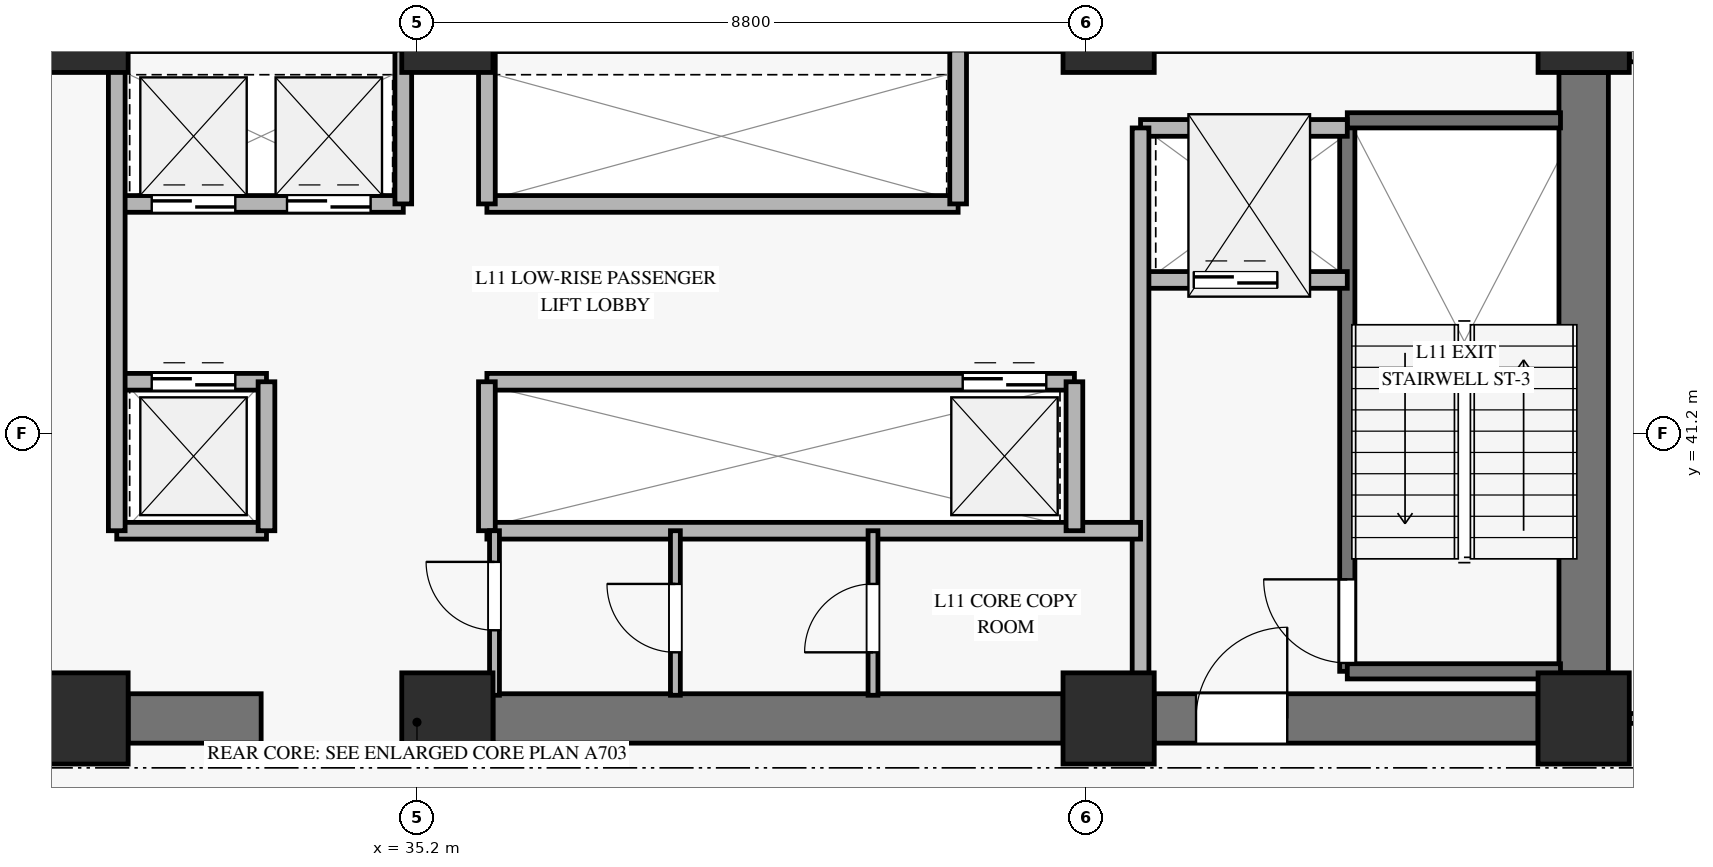
"""IFC4 building model, lengths in metres.
Left out: names, types, materials, properties, quantities, classifications, styles, units other than length and angle.
Written with IfcOpenShell. Run it as: python <this file> out.ifc"""

import sys

from ifc_helpers import new_model, si_unit, direction, frame, frame_2d, origin, origin_2d, place, context, subcontext, project, spatial, rectangle, extrude, source, transform, mapped, element, fill, save


model = new_model("IFC4")
c1 = context("Model", 3, precision=1e-05, world=origin(), true_north=direction((0.0, 1.0)))
c2 = subcontext(c1, "Body", "Model", "MODEL_VIEW")
j1 = project(units=[si_unit("LENGTHUNIT", "METRE"), si_unit("PLANEANGLEUNIT", "RADIAN")], contexts=[c1])
p1 = place(None, origin())
s1 = spatial("IfcSite", under=j1, at=p1, CompositionType="ELEMENT")
p2 = place(p1, origin())
s2 = spatial("IfcBuilding", under=s1, at=p2, CompositionType="ELEMENT")
p3 = place(p2, frame((0.0, 0.0, 44.9)))
s3 = spatial("IfcBuildingStorey", under=s2, at=p3, CompositionType="ELEMENT", Elevation=44.9)
m1 = source(origin(), c2, "Body", "SweptSolid", [
    extrude(rectangle(XDim=1.2, YDim=1.2, at=origin_2d()), origin(), (0.0, 0.0, 1.0), 3.62),
])
for number, where, z_axis, x_axis in (
    (1, (30.8, 37.45, 0.0), (0.0, 0.0, 1.0), (1.0, 0.0, 0.0)),
    (2, (30.8, 46.55, 0.0), (0.0, 0.0, 1.0), (1.0, 0.0, 0.0)),
    (3, (35.6, 37.45, 0.0), (0.0, 0.0, 1.0), (1.0, 0.0, 0.0)),
    (4, (35.6, 46.55, 0.0), (0.0, 0.0, 1.0), (1.0, 0.0, 0.0)),
    (5, (44.3, 37.45, 0.0), (0.0, 0.0, 1.0), (1.0, 0.0, 0.0)),
    (6, (44.3, 46.55, 0.0), (0.0, 0.0, 1.0), (1.0, 0.0, 0.0)),
    (7, (50.55, 37.45, 0.0), (0.0, 0.0, 1.0), (1.0, 0.0, 0.0)),
    (8, (50.55, 46.55, 0.0), (0.0, 0.0, 1.0), (1.0, 0.0, 0.0)),
):
    element("IfcColumn", number, at=place(p3, frame(where, z_axis=z_axis, x_axis=x_axis)), inside=s3, PredefinedType="PILASTER", context=c2, shape_type="MappedRepresentation", body=[
        mapped(m1, transform((0.0, 0.0, 0.0), x_axis=(1.0, 0.0, 0.0), y_axis=(0.0, 1.0, 0.0), z_axis=(0.0, 0.0, 1.0), scale=1.0)),
    ])
p4 = place(p3, frame((31.4, 37.45, 0.0), z_axis=(0.0, 0.0, 1.0), x_axis=(1.0, 0.0, 0.0)))
e9 = element("IfcWall", 9, at=p4, inside=s3, PredefinedType="SHEAR", context=c2, shape_type="SweptSolid", body=[
    extrude(rectangle(XDim=1.75, YDim=0.65, at=frame_2d((0.875, 0.0))), origin(), (0.0, 0.0, 1.0), 3.62),
])
p5 = place(p3, frame((36.2, 37.45, 0.0), z_axis=(0.0, 0.0, 1.0), x_axis=(1.0, 0.0, 0.0)))
e10 = element("IfcWall", 10, at=p5, inside=s3, PredefinedType="SHEAR", context=c2, shape_type="SweptSolid", body=[
    extrude(rectangle(XDim=7.5, YDim=0.65, at=frame_2d((3.75, 0.0))), origin(), (0.0, 0.0, 1.0), 3.62),
])
p6 = place(p3, frame((44.9, 37.45, 0.0), z_axis=(0.0, 0.0, 1.0), x_axis=(1.0, 0.0, 0.0)))
e11 = element("IfcWall", 11, at=p6, inside=s3, PredefinedType="SHEAR", context=c2, shape_type="SweptSolid", body=[
    extrude(rectangle(XDim=5.05, YDim=0.65, at=frame_2d((2.525, 0.0))), origin(), (0.0, 0.0, 1.0), 3.62),
])
p7 = place(p6, frame((0.55, 0.0, 0.0)))
e12 = element("IfcOpeningElement", 12, at=p7, cuts=e11, PredefinedType="OPENING", context=c2, shape_type="SweptSolid", body=[
    extrude(rectangle(XDim=1.2, YDim=2.15, at=frame_2d((0.6, 1.075))), frame((0.0, 0.335, 0.0), z_axis=(0.0, -1.0, 0.0), x_axis=(1.0, 0.0, 0.0)), (0.0, 0.0, 1.0), 0.67),
])
p8 = place(p3, frame((50.55, 38.05, 0.0), z_axis=(0.0, 0.0, 1.0), x_axis=(0.0, 1.0, 0.0)))
e13 = element("IfcWall", 13, at=p8, inside=s3, PredefinedType="SHEAR", context=c2, shape_type="SweptSolid", body=[
    extrude(rectangle(XDim=7.9, YDim=0.65, at=frame_2d((3.95, 0.0))), origin(), (0.0, 0.0, 1.0), 3.62),
])
p9 = place(p3, frame((51.15, 46.25, 0.0), z_axis=(0.0, 0.0, 1.0), x_axis=(1.0, 0.0, 0.0)))
e14 = element("IfcWall", 14, at=p9, inside=s3, PredefinedType="SOLIDWALL", context=c2, shape_type="SweptSolid", body=[
    extrude(rectangle(XDim=12.191, YDim=0.32, at=frame_2d((6.096, 0.0))), origin(), (0.0, 0.0, 1.0), 3.1),
])
p10 = place(p9, frame((5.296, 0.0, 0.45)))
e15 = element("IfcOpeningElement", 15, at=p10, cuts=e14, PredefinedType="OPENING", context=c2, shape_type="SweptSolid", body=[
    extrude(rectangle(XDim=1.6, YDim=2.0, at=frame_2d((0.8, 1.0))), frame((0.0, 0.17, 0.0), z_axis=(0.0, -1.0, 0.0), x_axis=(1.0, 0.0, 0.0)), (0.0, 0.0, 1.0), 0.34),
])
p11 = place(p3, frame((47.44, 38.07, 0.0), z_axis=(0.0, 0.0, 1.0), x_axis=(0.0, 1.0, 0.0)))
e16 = element("IfcWall", 16, at=p11, inside=s3, PredefinedType="SOLIDWALL", context=c2, shape_type="SweptSolid", body=[
    extrude(rectangle(XDim=7.25, YDim=0.2, at=frame_2d((3.625, 0.0))), origin(), (0.0, 0.0, 1.0), 3.9),
])
p12 = place(p11, frame((0.11, 0.0, 0.0)))
e17 = element("IfcOpeningElement", 17, at=p12, cuts=e16, PredefinedType="OPENING", context=c2, shape_type="SweptSolid", body=[
    extrude(rectangle(XDim=1.1, YDim=2.15, at=frame_2d((0.55, 1.075))), frame((0.0, 0.11, 0.0), z_axis=(0.0, -1.0, 0.0), x_axis=(1.0, 0.0, 0.0)), (0.0, 0.0, 1.0), 0.22),
])
for number, where, z_axis, x_axis in (
    (18, (47.44, 45.32, 0.0), (0.0, 0.0, 1.0), (1.0, 0.0, 0.0)),
    (19, (47.44, 38.07, 0.0), (0.0, 0.0, 1.0), (1.0, 0.0, 0.0)),
):
    element("IfcWall", number, at=place(p3, frame(where, z_axis=z_axis, x_axis=x_axis)), inside=s3, PredefinedType="SOLIDWALL", context=c2, shape_type="SweptSolid", body=[
        extrude(rectangle(XDim=2.805, YDim=0.2, at=frame_2d((1.403, 0.0))), origin(), (0.0, 0.0, 1.0), 3.9),
    ])
p13 = place(p3, frame((44.72, 43.22, 0.0), z_axis=(0.0, 0.0, 1.0), x_axis=(1.0, 0.0, 0.0)))
e20 = element("IfcWall", 20, at=p13, inside=s3, PredefinedType="SOLIDWALL", context=c2, shape_type="SweptSolid", body=[
    extrude(rectangle(XDim=2.72, YDim=0.22, at=frame_2d((1.36, 0.0))), origin(), (0.0, 0.0, 1.0), 3.62),
])
p14 = place(p13, frame((0.7, 0.0, 0.0)))
e21 = element("IfcOpeningElement", 21, at=p14, cuts=e20, PredefinedType="OPENING", context=c2, shape_type="SweptSolid", body=[
    extrude(rectangle(XDim=1.1, YDim=2.2, at=frame_2d((0.55, 1.1))), frame((0.0, 0.12, 0.0), z_axis=(0.0, -1.0, 0.0), x_axis=(1.0, 0.0, 0.0)), (0.0, 0.0, 1.0), 0.24),
])
p15 = place(p3, frame((44.72, 45.22, 0.0), z_axis=(0.0, 0.0, 1.0), x_axis=(1.0, 0.0, 0.0)))
e22 = element("IfcWall", 22, at=p15, inside=s3, PredefinedType="SOLIDWALL", context=c2, shape_type="SweptSolid", body=[
    extrude(rectangle(XDim=2.72, YDim=0.22, at=frame_2d((1.36, 0.0))), origin(), (0.0, 0.0, 1.0), 3.62),
])
p16 = place(p3, frame((44.72, 37.755, 0.0), z_axis=(0.0, 0.0, 1.0), x_axis=(0.0, 1.0, 0.0)))
e23 = element("IfcWall", 23, at=p16, inside=s3, PredefinedType="SOLIDWALL", context=c2, shape_type="SweptSolid", body=[
    extrude(rectangle(XDim=7.465, YDim=0.22, at=frame_2d((3.732, 0.0))), origin(), (0.0, 0.0, 1.0), 3.62),
])
p17 = place(p3, frame((31.25, 44.22, 0.0), z_axis=(0.0, 0.0, 1.0), x_axis=(1.0, 0.0, 0.0)))
e24 = element("IfcWall", 24, at=p17, inside=s3, PredefinedType="SOLIDWALL", context=c2, shape_type="SweptSolid", body=[
    extrude(rectangle(XDim=3.77, YDim=0.22, at=frame_2d((1.885, 0.0))), origin(), (0.0, 0.0, 1.0), 3.62),
])
p18 = place(p17, frame((0.46, 0.0, 0.0)))
e25 = element("IfcOpeningElement", 25, at=p18, cuts=e24, PredefinedType="OPENING", context=c2, shape_type="SweptSolid", body=[
    extrude(rectangle(XDim=1.1, YDim=2.2, at=frame_2d((0.55, 1.1))), frame((0.0, 0.12, 0.0), z_axis=(0.0, -1.0, 0.0), x_axis=(1.0, 0.0, 0.0)), (0.0, 0.0, 1.0), 0.24),
])
p19 = place(p17, frame((2.24, 0.0, 0.0)))
e26 = element("IfcOpeningElement", 26, at=p19, cuts=e24, PredefinedType="OPENING", context=c2, shape_type="SweptSolid", body=[
    extrude(rectangle(XDim=1.1, YDim=2.2, at=frame_2d((0.55, 1.1))), frame((0.0, 0.12, 0.0), z_axis=(0.0, -1.0, 0.0), x_axis=(1.0, 0.0, 0.0)), (0.0, 0.0, 1.0), 0.24),
])
p20 = place(p3, frame((36.12, 44.22, 0.0), z_axis=(0.0, 0.0, 1.0), x_axis=(1.0, 0.0, 0.0)))
e27 = element("IfcWall", 27, at=p20, inside=s3, PredefinedType="SOLIDWALL", context=c2, shape_type="SweptSolid", body=[
    extrude(rectangle(XDim=6.2, YDim=0.22, at=frame_2d((3.1, 0.0))), origin(), (0.0, 0.0, 1.0), 3.62),
])
for number, where, z_axis, x_axis in (
    (28, (35.02, 44.22, 0.0), (0.0, 0.0, 1.0), (0.0, 1.0, 0.0)),
    (29, (36.12, 44.22, 0.0), (0.0, 0.0, 1.0), (0.0, 1.0, 0.0)),
    (30, (42.32, 44.22, 0.0), (0.0, 0.0, 1.0), (0.0, 1.0, 0.0)),
):
    element("IfcWall", number, at=place(p3, frame(where, z_axis=z_axis, x_axis=x_axis)), inside=s3, PredefinedType="SOLIDWALL", context=c2, shape_type="SweptSolid", body=[
        extrude(rectangle(XDim=2.025, YDim=0.22, at=frame_2d((1.013, 0.0))), origin(), (0.0, 0.0, 1.0), 3.62),
    ])
p21 = place(p3, frame((31.25, 41.88, 0.0), z_axis=(0.0, 0.0, 1.0), x_axis=(1.0, 0.0, 0.0)))
e31 = element("IfcWall", 31, at=p21, inside=s3, PredefinedType="SOLIDWALL", context=c2, shape_type="SweptSolid", body=[
    extrude(rectangle(XDim=1.97, YDim=0.22, at=frame_2d((0.985, 0.0))), origin(), (0.0, 0.0, 1.0), 3.62),
])
p22 = place(p21, frame((0.46, 0.0, 0.0)))
e32 = element("IfcOpeningElement", 32, at=p22, cuts=e31, PredefinedType="OPENING", context=c2, shape_type="SweptSolid", body=[
    extrude(rectangle(XDim=1.1, YDim=2.2, at=frame_2d((0.55, 1.1))), frame((0.0, 0.12, 0.0), z_axis=(0.0, -1.0, 0.0), x_axis=(1.0, 0.0, 0.0)), (0.0, 0.0, 1.0), 0.24),
])
p23 = place(p3, frame((36.12, 41.88, 0.0), z_axis=(0.0, 0.0, 1.0), x_axis=(1.0, 0.0, 0.0)))
e33 = element("IfcWall", 33, at=p23, inside=s3, PredefinedType="SOLIDWALL", context=c2, shape_type="SweptSolid", body=[
    extrude(rectangle(XDim=7.73, YDim=0.22, at=frame_2d((3.865, 0.0))), origin(), (0.0, 0.0, 1.0), 3.62),
])
p24 = place(p23, frame((6.26, 0.0, 0.0)))
e34 = element("IfcOpeningElement", 34, at=p24, cuts=e33, PredefinedType="OPENING", context=c2, shape_type="SweptSolid", body=[
    extrude(rectangle(XDim=1.1, YDim=2.2, at=frame_2d((0.55, 1.1))), frame((0.0, 0.12, 0.0), z_axis=(0.0, -1.0, 0.0), x_axis=(1.0, 0.0, 0.0)), (0.0, 0.0, 1.0), 0.24),
])
p25 = place(p3, frame((31.25, 39.92, 0.0), z_axis=(0.0, 0.0, 1.0), x_axis=(1.0, 0.0, 0.0)))
e35 = element("IfcWall", 35, at=p25, inside=s3, PredefinedType="SOLIDWALL", context=c2, shape_type="SweptSolid", body=[
    extrude(rectangle(XDim=1.97, YDim=0.22, at=frame_2d((0.985, 0.0))), origin(), (0.0, 0.0, 1.0), 3.62),
])
p26 = place(p3, frame((33.22, 39.92, 0.0), z_axis=(0.0, 0.0, 1.0), x_axis=(0.0, 1.0, 0.0)))
e36 = element("IfcWall", 36, at=p26, inside=s3, PredefinedType="SOLIDWALL", context=c2, shape_type="SweptSolid", body=[
    extrude(rectangle(XDim=1.96, YDim=0.22, at=frame_2d((0.98, 0.0))), origin(), (0.0, 0.0, 1.0), 3.62),
])
p27 = place(p3, frame((36.12, 39.92, 0.0), z_axis=(0.0, 0.0, 1.0), x_axis=(1.0, 0.0, 0.0)))
e37 = element("IfcWall", 37, at=p27, inside=s3, PredefinedType="SOLIDWALL", context=c2, shape_type="SweptSolid", body=[
    extrude(rectangle(XDim=8.6, YDim=0.22, at=frame_2d((4.3, 0.0))), origin(), (0.0, 0.0, 1.0), 2.905),
])
p28 = place(p3, frame((36.12, 39.92, 0.0), z_axis=(0.0, 0.0, 1.0), x_axis=(0.0, 1.0, 0.0)))
e38 = element("IfcWall", 38, at=p28, inside=s3, PredefinedType="SOLIDWALL", context=c2, shape_type="SweptSolid", body=[
    extrude(rectangle(XDim=1.96, YDim=0.22, at=frame_2d((0.98, 0.0))), origin(), (0.0, 0.0, 1.0), 3.62),
])
p29 = place(p3, frame((31.25, 39.92, 0.0), z_axis=(0.0, 0.0, 1.0), x_axis=(0.0, 1.0, 0.0)))
e39 = element("IfcWall", 39, at=p29, inside=s3, PredefinedType="SOLIDWALL", context=c2, shape_type="SweptSolid", body=[
    extrude(rectangle(XDim=6.325, YDim=0.22, at=frame_2d((3.163, 0.0))), origin(), (0.0, 0.0, 1.0), 3.62),
])
p30 = place(p3, frame((43.85, 39.92, 0.0), z_axis=(0.0, 0.0, 1.0), x_axis=(0.0, 1.0, 0.0)))
e40 = element("IfcWall", 40, at=p30, inside=s3, PredefinedType="SOLIDWALL", context=c2, shape_type="SweptSolid", body=[
    extrude(rectangle(XDim=1.96, YDim=0.22, at=frame_2d((0.98, 0.0))), origin(), (0.0, 0.0, 1.0), 3.62),
])
p31 = place(p3, frame((36.22, 37.755, 0.0), z_axis=(0.0, 0.0, 1.0), x_axis=(0.0, 1.0, 0.0)))
e41 = element("IfcWall", 41, at=p31, inside=s3, PredefinedType="PARTITIONING", context=c2, shape_type="SweptSolid", body=[
    extrude(rectangle(XDim=2.165, YDim=0.13, at=frame_2d((1.083, 0.0))), origin(), (0.0, 0.0, 1.0), 3.62),
])
p32 = place(p31, frame((0.855, 0.0, 0.0)))
e42 = element("IfcOpeningElement", 42, at=p32, cuts=e41, PredefinedType="OPENING", context=c2, shape_type="SweptSolid", body=[
    extrude(rectangle(XDim=0.9, YDim=2.1, at=frame_2d((0.45, 1.05))), frame((0.0, 0.075, 0.0), z_axis=(0.0, -1.0, 0.0), x_axis=(1.0, 0.0, 0.0)), (0.0, 0.0, 1.0), 0.15),
])
p33 = place(p3, frame((38.6, 37.755, 0.0), z_axis=(0.0, 0.0, 1.0), x_axis=(0.0, 1.0, 0.0)))
e43 = element("IfcWall", 43, at=p33, inside=s3, PredefinedType="PARTITIONING", context=c2, shape_type="SweptSolid", body=[
    extrude(rectangle(XDim=2.165, YDim=0.13, at=frame_2d((1.083, 0.0))), origin(), (0.0, 0.0, 1.0), 3.62),
])
p34 = place(p33, frame((0.565, 0.0, 0.0)))
e44 = element("IfcOpeningElement", 44, at=p34, cuts=e43, PredefinedType="OPENING", context=c2, shape_type="SweptSolid", body=[
    extrude(rectangle(XDim=0.9, YDim=2.1, at=frame_2d((0.45, 1.05))), frame((0.0, 0.075, 0.0), z_axis=(0.0, -1.0, 0.0), x_axis=(1.0, 0.0, 0.0)), (0.0, 0.0, 1.0), 0.15),
])
p35 = place(p3, frame((41.2, 37.755, 0.0), z_axis=(0.0, 0.0, 1.0), x_axis=(0.0, 1.0, 0.0)))
e45 = element("IfcWall", 45, at=p35, inside=s3, PredefinedType="PARTITIONING", context=c2, shape_type="SweptSolid", body=[
    extrude(rectangle(XDim=2.165, YDim=0.13, at=frame_2d((1.083, 0.0))), origin(), (0.0, 0.0, 1.0), 3.62),
])
p36 = place(p35, frame((0.565, 0.0, 0.0)))
e46 = element("IfcOpeningElement", 46, at=p36, cuts=e45, PredefinedType="OPENING", context=c2, shape_type="SweptSolid", body=[
    extrude(rectangle(XDim=0.9, YDim=2.1, at=frame_2d((0.45, 1.05))), frame((0.0, 0.075, 0.0), z_axis=(0.0, -1.0, 0.0), x_axis=(1.0, 0.0, 0.0)), (0.0, 0.0, 1.0), 0.15),
])
p37 = place(p3, frame((51.15, 37.45, 0.0), z_axis=(0.0, 0.0, 1.0), x_axis=(1.0, 0.0, 0.0)))
e47 = element("IfcWall", 47, at=p37, inside=s3, PredefinedType="PARTITIONING", context=c2, shape_type="SweptSolid", body=[
    extrude(rectangle(XDim=15.915, YDim=0.13, at=frame_2d((7.958, 0.0))), origin(), (0.0, 0.0, 1.0), 3.105),
])
p38 = place(p37, frame((0.5, 0.0, 0.0)))
e48 = element("IfcOpeningElement", 48, at=p38, cuts=e47, PredefinedType="OPENING", context=c2, shape_type="SweptSolid", body=[
    extrude(rectangle(XDim=0.9, YDim=2.1, at=frame_2d((0.45, 1.05))), frame((0.0, 0.075, 0.0), z_axis=(0.0, -1.0, 0.0), x_axis=(1.0, 0.0, 0.0)), (0.0, 0.0, 1.0), 0.15),
])
p39 = place(p37, frame((11.416, 0.0, 0.0)))
e49 = element("IfcOpeningElement", 49, at=p39, cuts=e47, PredefinedType="OPENING", context=c2, shape_type="SweptSolid", body=[
    extrude(rectangle(XDim=0.95, YDim=2.1, at=frame_2d((0.475, 1.05))), frame((0.0, 0.075, 0.0), z_axis=(0.0, -1.0, 0.0), x_axis=(1.0, 0.0, 0.0)), (0.0, 0.0, 1.0), 0.15),
])
m2 = source(origin(), c2, "Body", "SweptSolid", [
    extrude(rectangle(XDim=1.1, YDim=2.15, at=frame_2d((0.55, 1.075))), frame((0.0, 0.025, 0.0), z_axis=(0.0, -1.0, 0.0), x_axis=(1.0, 0.0, 0.0)), (0.0, 0.0, 1.0), 0.05),
])
p40 = place(p12, origin())
e50 = element("IfcDoor", 50, at=p40, inside=s3, OperationType="SINGLE_SWING_RIGHT", PredefinedType="DOOR", context=c2, shape_type="MappedRepresentation", body=[
    mapped(m2, transform((0.0, 0.0, 0.0), x_axis=(1.0, 0.0, 0.0), y_axis=(0.0, 1.0, 0.0), z_axis=(0.0, 0.0, 1.0), scale=1.0)),
])
fill(e17, e50)
m3 = source(origin(), c2, "Body", "SweptSolid", [
    extrude(rectangle(XDim=1.1, YDim=2.2, at=frame_2d((0.55, 1.1))), frame((0.0, 0.025, 0.0), z_axis=(0.0, -1.0, 0.0), x_axis=(1.0, 0.0, 0.0)), (0.0, 0.0, 1.0), 0.05),
])
p41 = place(p14, origin())
e51 = element("IfcDoor", 51, at=p41, inside=s3, OperationType="SLIDING_TO_LEFT", PredefinedType="DOOR", context=c2, shape_type="MappedRepresentation", body=[
    mapped(m3, transform((0.0, 0.0, 0.0), x_axis=(1.0, 0.0, 0.0), y_axis=(0.0, 1.0, 0.0), z_axis=(0.0, 0.0, 1.0), scale=1.0)),
])
fill(e21, e51)
m4 = source(origin(), c2, "Body", "SweptSolid", [
    extrude(rectangle(XDim=1.2, YDim=2.15, at=frame_2d((0.6, 1.075))), frame((0.0, 0.025, 0.0), z_axis=(0.0, -1.0, 0.0), x_axis=(1.0, 0.0, 0.0)), (0.0, 0.0, 1.0), 0.05),
])
p42 = place(p7, origin())
e52 = element("IfcDoor", 52, at=p42, inside=s3, OperationType="SINGLE_SWING_RIGHT", PredefinedType="DOOR", context=c2, shape_type="MappedRepresentation", body=[
    mapped(m4, transform((0.0, 0.0, 0.0), x_axis=(1.0, 0.0, 0.0), y_axis=(0.0, 1.0, 0.0), z_axis=(0.0, 0.0, 1.0), scale=1.0)),
])
fill(e12, e52)
p43 = place(p18, origin())
e53 = element("IfcDoor", 53, at=p43, inside=s3, OperationType="SLIDING_TO_LEFT", PredefinedType="DOOR", context=c2, shape_type="MappedRepresentation", body=[
    mapped(m3, transform((0.0, 0.0, 0.0), x_axis=(1.0, 0.0, 0.0), y_axis=(0.0, 1.0, 0.0), z_axis=(0.0, 0.0, 1.0), scale=1.0)),
])
fill(e25, e53)
p44 = place(p19, origin())
e54 = element("IfcDoor", 54, at=p44, inside=s3, OperationType="SLIDING_TO_LEFT", PredefinedType="DOOR", context=c2, shape_type="MappedRepresentation", body=[
    mapped(m3, transform((0.0, 0.0, 0.0), x_axis=(1.0, 0.0, 0.0), y_axis=(0.0, 1.0, 0.0), z_axis=(0.0, 0.0, 1.0), scale=1.0)),
])
fill(e26, e54)
p45 = place(p22, origin())
e55 = element("IfcDoor", 55, at=p45, inside=s3, OperationType="SLIDING_TO_LEFT", PredefinedType="DOOR", context=c2, shape_type="MappedRepresentation", body=[
    mapped(m3, transform((0.0, 0.0, 0.0), x_axis=(1.0, 0.0, 0.0), y_axis=(0.0, 1.0, 0.0), z_axis=(0.0, 0.0, 1.0), scale=1.0)),
])
fill(e32, e55)
p46 = place(p24, origin())
e56 = element("IfcDoor", 56, at=p46, inside=s3, OperationType="SLIDING_TO_LEFT", PredefinedType="DOOR", context=c2, shape_type="MappedRepresentation", body=[
    mapped(m3, transform((0.0, 0.0, 0.0), x_axis=(1.0, 0.0, 0.0), y_axis=(0.0, 1.0, 0.0), z_axis=(0.0, 0.0, 1.0), scale=1.0)),
])
fill(e34, e56)
m5 = source(origin(), c2, "Body", "SweptSolid", [
    extrude(rectangle(XDim=0.9, YDim=2.1, at=frame_2d((0.45, 1.05))), frame((0.0, 0.025, 0.0), z_axis=(0.0, -1.0, 0.0), x_axis=(1.0, 0.0, 0.0)), (0.0, 0.0, 1.0), 0.05),
])
p47 = place(p32, origin())
e57 = element("IfcDoor", 57, at=p47, inside=s3, OperationType="SINGLE_SWING_RIGHT", PredefinedType="DOOR", context=c2, shape_type="MappedRepresentation", body=[
    mapped(m5, transform((0.0, 0.0, 0.0), x_axis=(1.0, 0.0, 0.0), y_axis=(0.0, 1.0, 0.0), z_axis=(0.0, 0.0, 1.0), scale=1.0)),
])
fill(e42, e57)
p48 = place(p34, origin())
e58 = element("IfcDoor", 58, at=p48, inside=s3, OperationType="SINGLE_SWING_RIGHT", PredefinedType="DOOR", context=c2, shape_type="MappedRepresentation", body=[
    mapped(m5, transform((0.0, 0.0, 0.0), x_axis=(1.0, 0.0, 0.0), y_axis=(0.0, 1.0, 0.0), z_axis=(0.0, 0.0, 1.0), scale=1.0)),
])
fill(e44, e58)
p49 = place(p36, origin())
e59 = element("IfcDoor", 59, at=p49, inside=s3, OperationType="SINGLE_SWING_LEFT", PredefinedType="DOOR", context=c2, shape_type="MappedRepresentation", body=[
    mapped(m5, transform((0.0, 0.0, 0.0), x_axis=(1.0, 0.0, 0.0), y_axis=(0.0, 1.0, 0.0), z_axis=(0.0, 0.0, 1.0), scale=1.0)),
])
fill(e46, e59)
save(model, sys.argv[1])
